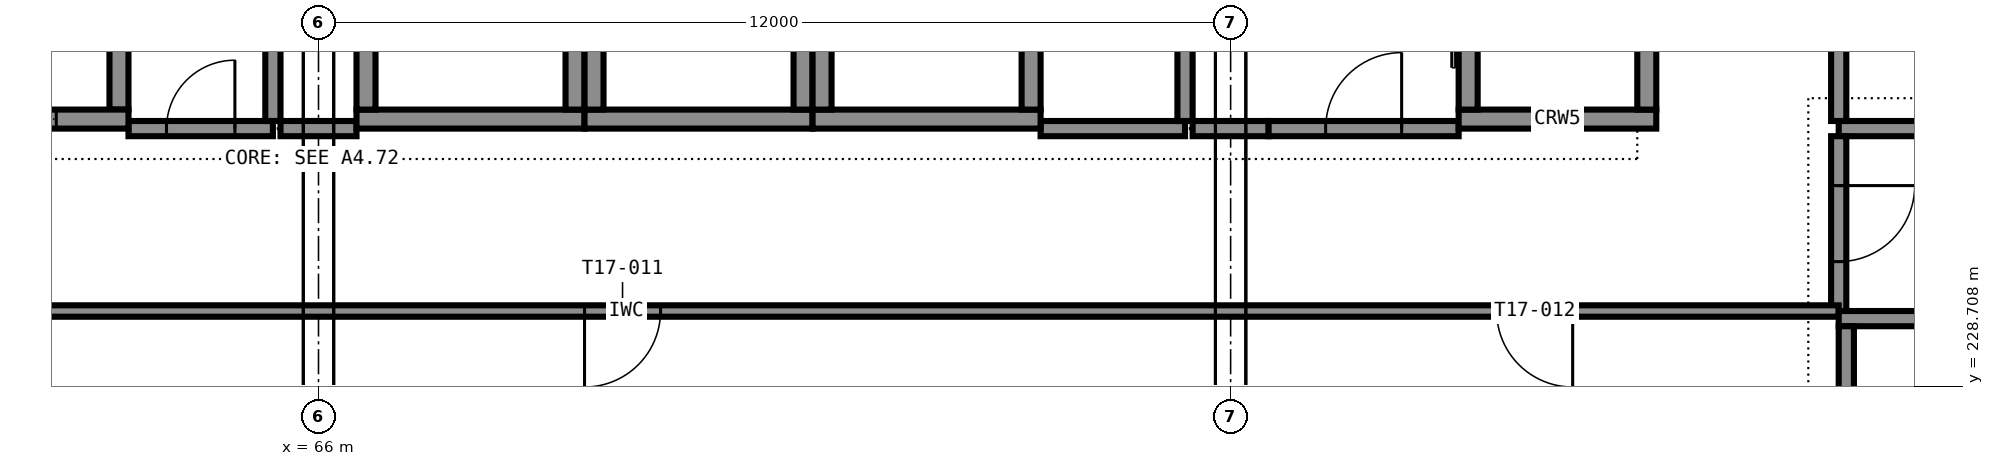
"""IFC4 building model, lengths in metres.
Left out: names, types, materials, properties, quantities, classifications, styles, units other than length and angle.
Written with IfcOpenShell. Run it as: python <this file> out.ifc"""

import sys

from ifc_helpers import new_model, si_unit, direction, frame, frame_2d, origin, place, context, subcontext, project, spatial, rectangle, extrude, element, fill, save


model = new_model("IFC4")
c1 = context("Model", 3, precision=1e-05, world=origin(), true_north=direction((0.0, 1.0)))
c2 = subcontext(c1, "Body", "Model", "MODEL_VIEW")
j1 = project(units=[si_unit("LENGTHUNIT", "METRE"), si_unit("PLANEANGLEUNIT", "RADIAN")], contexts=[c1])
p1 = place(None, origin())
s1 = spatial("IfcSite", under=j1, at=p1, CompositionType="ELEMENT")
p2 = place(p1, origin())
s2 = spatial("IfcBuilding", under=s1, at=p2, CompositionType="ELEMENT")
p3 = place(p2, frame((0.0, 0.0, 67.8)))
s3 = spatial("IfcBuildingStorey", under=s2, at=p3, CompositionType="ELEMENT", Elevation=67.8)
p4 = place(p3, frame((60.5, 232.225, 0.0), z_axis=(0.0, 0.0, 1.0), x_axis=(1.0, 0.0, 0.0)))
e1 = element("IfcWall", 1, at=p4, inside=s3, PredefinedType="SHEAR", context=c2, shape_type="SweptSolid", body=[
    extrude(rectangle(XDim=3.0, YDim=0.25, at=frame_2d((1.5, 0.0))), origin(), (0.0, 0.0, 1.0), 3.6),
])
p5 = place(p4, frame((0.95, 0.0, 0.0)))
e2 = element("IfcOpeningElement", 2, at=p5, cuts=e1, PredefinedType="OPENING", context=c2, shape_type="SweptSolid", body=[
    extrude(rectangle(XDim=1.1, YDim=2.1, at=frame_2d((0.55, 1.05))), frame((0.0, 0.135, 0.0), z_axis=(0.0, -1.0, 0.0), x_axis=(1.0, 0.0, 0.0)), (0.0, 0.0, 1.0), 0.27),
])
p6 = place(p3, frame((63.375, 232.35, 0.0), z_axis=(0.0, 0.0, 1.0), x_axis=(0.0, 1.0, 0.0)))
e3 = element("IfcWall", 3, at=p6, inside=s3, PredefinedType="SHEAR", context=c2, shape_type="SweptSolid", body=[
    extrude(rectangle(XDim=3.3, YDim=0.25, at=frame_2d((1.65, 0.0))), origin(), (0.0, 0.0, 1.0), 3.6),
])
p7 = place(p3, frame((66.5, 232.225, 0.0), z_axis=(0.0, 0.0, 1.0), x_axis=(1.0, 0.0, 0.0)))
e4 = element("IfcWall", 4, at=p7, inside=s3, PredefinedType="SHEAR", context=c2, shape_type="SweptSolid", body=[
    extrude(rectangle(XDim=3.0, YDim=0.25, at=frame_2d((1.5, 0.0))), origin(), (0.0, 0.0, 1.0), 3.6),
])
for number, where, z_axis, x_axis in (
    (5, (66.625, 232.35, 0.0), (0.0, 0.0, 1.0), (0.0, 1.0, 0.0)),
    (6, (69.375, 232.35, 0.0), (0.0, 0.0, 1.0), (0.0, 1.0, 0.0)),
):
    element("IfcWall", number, at=place(p3, frame(where, z_axis=z_axis, x_axis=x_axis)), inside=s3, PredefinedType="SHEAR", context=c2, shape_type="SweptSolid", body=[
        extrude(rectangle(XDim=3.3, YDim=0.25, at=frame_2d((1.65, 0.0))), origin(), (0.0, 0.0, 1.0), 3.6),
    ])
p8 = place(p3, frame((69.5, 232.225, 0.0), z_axis=(0.0, 0.0, 1.0), x_axis=(1.0, 0.0, 0.0)))
e7 = element("IfcWall", 7, at=p8, inside=s3, PredefinedType="SHEAR", context=c2, shape_type="SweptSolid", body=[
    extrude(rectangle(XDim=3.0, YDim=0.25, at=frame_2d((1.5, 0.0))), origin(), (0.0, 0.0, 1.0), 3.6),
])
for number, where, z_axis, x_axis in (
    (8, (69.625, 232.35, 0.0), (0.0, 0.0, 1.0), (0.0, 1.0, 0.0)),
    (9, (72.375, 232.35, 0.0), (0.0, 0.0, 1.0), (0.0, 1.0, 0.0)),
):
    element("IfcWall", number, at=place(p3, frame(where, z_axis=z_axis, x_axis=x_axis)), inside=s3, PredefinedType="SHEAR", context=c2, shape_type="SweptSolid", body=[
        extrude(rectangle(XDim=3.3, YDim=0.25, at=frame_2d((1.65, 0.0))), origin(), (0.0, 0.0, 1.0), 3.6),
    ])
p9 = place(p3, frame((72.5, 232.225, 0.0), z_axis=(0.0, 0.0, 1.0), x_axis=(1.0, 0.0, 0.0)))
e10 = element("IfcWall", 10, at=p9, inside=s3, PredefinedType="SHEAR", context=c2, shape_type="SweptSolid", body=[
    extrude(rectangle(XDim=3.0, YDim=0.25, at=frame_2d((1.5, 0.0))), origin(), (0.0, 0.0, 1.0), 3.6),
])
for number, where, z_axis, x_axis in (
    (11, (72.625, 232.35, 0.0), (0.0, 0.0, 1.0), (0.0, 1.0, 0.0)),
    (12, (75.375, 232.35, 0.0), (0.0, 0.0, 1.0), (0.0, 1.0, 0.0)),
):
    element("IfcWall", number, at=place(p3, frame(where, z_axis=z_axis, x_axis=x_axis)), inside=s3, PredefinedType="SHEAR", context=c2, shape_type="SweptSolid", body=[
        extrude(rectangle(XDim=3.3, YDim=0.25, at=frame_2d((1.65, 0.0))), origin(), (0.0, 0.0, 1.0), 3.6),
    ])
p10 = place(p3, frame((81.0, 232.225, 0.0), z_axis=(0.0, 0.0, 1.0), x_axis=(1.0, 0.0, 0.0)))
e13 = element("IfcWall", 13, at=p10, inside=s3, PredefinedType="SHEAR", context=c2, shape_type="SweptSolid", body=[
    extrude(rectangle(XDim=2.6, YDim=0.25, at=frame_2d((1.3, 0.0))), origin(), (0.0, 0.0, 1.0), 3.6),
])
p11 = place(p3, frame((81.125, 232.35, 0.0), z_axis=(0.0, 0.0, 1.0), x_axis=(0.0, 1.0, 0.0)))
e14 = element("IfcWall", 14, at=p11, inside=s3, PredefinedType="SHEAR", context=c2, shape_type="SweptSolid", body=[
    extrude(rectangle(XDim=3.3, YDim=0.25, at=frame_2d((1.65, 0.0))), origin(), (0.0, 0.0, 1.0), 3.6),
])
p12 = place(p11, frame((1.1, 0.0, 0.0)))
e15 = element("IfcOpeningElement", 15, at=p12, cuts=e14, PredefinedType="OPENING", context=c2, shape_type="SweptSolid", body=[
    extrude(rectangle(XDim=1.1, YDim=2.1, at=frame_2d((0.55, 1.05))), frame((0.0, 0.135, 0.0), z_axis=(0.0, -1.0, 0.0), x_axis=(1.0, 0.0, 0.0)), (0.0, 0.0, 1.0), 0.27),
])
p13 = place(p3, frame((83.475, 232.35, 0.0), z_axis=(0.0, 0.0, 1.0), x_axis=(0.0, 1.0, 0.0)))
e16 = element("IfcWall", 16, at=p13, inside=s3, PredefinedType="SHEAR", context=c2, shape_type="SweptSolid", body=[
    extrude(rectangle(XDim=3.3, YDim=0.25, at=frame_2d((1.65, 0.0))), origin(), (0.0, 0.0, 1.0), 3.6),
])
p14 = place(p3, frame((89.5, 229.6, 0.0), z_axis=(0.0, 0.0, 1.0), x_axis=(-1.0, 0.0, 0.0)))
e17 = element("IfcWall", 17, at=p14, inside=s3, PredefinedType="SHEAR", context=c2, shape_type="SweptSolid", body=[
    extrude(rectangle(XDim=3.5, YDim=0.2, at=frame_2d((1.75, 0.0))), origin(), (0.0, 0.0, 1.0), 3.6),
])
p15 = place(p14, frame((1.15, 0.0, 0.0)))
e18 = element("IfcOpeningElement", 18, at=p15, cuts=e17, PredefinedType="OPENING", context=c2, shape_type="SweptSolid", body=[
    extrude(rectangle(XDim=1.2, YDim=2.1, at=frame_2d((0.6, 1.05))), frame((0.0, 0.11, 0.0), z_axis=(0.0, -1.0, 0.0), x_axis=(1.0, 0.0, 0.0)), (0.0, 0.0, 1.0), 0.22),
])
p16 = place(p3, frame((86.1, 222.0, 0.0), z_axis=(0.0, 0.0, 1.0), x_axis=(0.0, 1.0, 0.0)))
e19 = element("IfcWall", 19, at=p16, inside=s3, PredefinedType="SHEAR", context=c2, shape_type="SweptSolid", body=[
    extrude(rectangle(XDim=7.5, YDim=0.2, at=frame_2d((3.75, 0.0))), origin(), (0.0, 0.0, 1.0), 3.6),
])
p17 = place(p3, frame((63.5, 232.1, 0.0), z_axis=(0.0, 0.0, 1.0), x_axis=(1.0, 0.0, 0.0)))
e20 = element("IfcWall", 20, at=p17, inside=s3, PredefinedType="PARTITIONING", context=c2, shape_type="SweptSolid", body=[
    extrude(rectangle(XDim=1.9, YDim=0.2, at=frame_2d((0.95, 0.0))), origin(), (0.0, 0.0, 1.0), 3.4),
])
p18 = place(p17, frame((0.5, 0.0, 0.0)))
e21 = element("IfcOpeningElement", 21, at=p18, cuts=e20, PredefinedType="OPENING", context=c2, shape_type="SweptSolid", body=[
    extrude(rectangle(XDim=0.9, YDim=2.1, at=frame_2d((0.45, 1.05))), frame((0.0, 0.11, 0.0), z_axis=(0.0, -1.0, 0.0), x_axis=(1.0, 0.0, 0.0)), (0.0, 0.0, 1.0), 0.22),
])
p19 = place(p3, frame((65.5, 232.1, 0.0), z_axis=(0.0, 0.0, 1.0), x_axis=(1.0, 0.0, 0.0)))
e22 = element("IfcWall", 22, at=p19, inside=s3, PredefinedType="PARTITIONING", context=c2, shape_type="SweptSolid", body=[
    extrude(rectangle(XDim=1.0, YDim=0.2, at=frame_2d((0.5, 0.0))), origin(), (0.0, 0.0, 1.0), 3.4),
])
p20 = place(p3, frame((75.5, 232.1, 0.0), z_axis=(0.0, 0.0, 1.0), x_axis=(1.0, 0.0, 0.0)))
e23 = element("IfcWall", 23, at=p20, inside=s3, PredefinedType="PARTITIONING", context=c2, shape_type="SweptSolid", body=[
    extrude(rectangle(XDim=1.9, YDim=0.2, at=frame_2d((0.95, 0.0))), origin(), (0.0, 0.0, 1.0), 3.4),
])
p21 = place(p3, frame((77.5, 232.1, 0.0), z_axis=(0.0, 0.0, 1.0), x_axis=(1.0, 0.0, 0.0)))
e24 = element("IfcWall", 24, at=p21, inside=s3, PredefinedType="PARTITIONING", context=c2, shape_type="SweptSolid", body=[
    extrude(rectangle(XDim=1.0, YDim=0.2, at=frame_2d((0.5, 0.0))), origin(), (0.0, 0.0, 1.0), 3.4),
])
p22 = place(p3, frame((78.5, 232.1, 0.0), z_axis=(0.0, 0.0, 1.0), x_axis=(1.0, 0.0, 0.0)))
e25 = element("IfcWall", 25, at=p22, inside=s3, PredefinedType="PARTITIONING", context=c2, shape_type="SweptSolid", body=[
    extrude(rectangle(XDim=2.5, YDim=0.2, at=frame_2d((1.25, 0.0))), origin(), (0.0, 0.0, 1.0), 3.4),
])
p23 = place(p22, frame((0.75, 0.0, 0.0)))
e26 = element("IfcOpeningElement", 26, at=p23, cuts=e25, PredefinedType="OPENING", context=c2, shape_type="SweptSolid", body=[
    extrude(rectangle(XDim=1.0, YDim=2.1, at=frame_2d((0.5, 1.05))), frame((0.0, 0.11, 0.0), z_axis=(0.0, -1.0, 0.0), x_axis=(1.0, 0.0, 0.0)), (0.0, 0.0, 1.0), 0.22),
])
p24 = place(p3, frame((86.0, 232.1, 0.0), z_axis=(0.0, 0.0, 1.0), x_axis=(1.0, 0.0, 0.0)))
e27 = element("IfcWall", 27, at=p24, inside=s3, PredefinedType="PARTITIONING", context=c2, shape_type="SweptSolid", body=[
    extrude(rectangle(XDim=3.8, YDim=0.2, at=frame_2d((1.9, 0.0))), origin(), (0.0, 0.0, 1.0), 3.4),
])
for number, where, z_axis, x_axis in (
    (28, (65.4, 232.2, 0.0), (0.0, 0.0, 1.0), (0.0, 1.0, 0.0)),
    (29, (77.4, 232.2, 0.0), (0.0, 0.0, 1.0), (0.0, 1.0, 0.0)),
):
    element("IfcWall", number, at=place(p3, frame(where, z_axis=z_axis, x_axis=x_axis)), inside=s3, PredefinedType="PARTITIONING", context=c2, shape_type="SweptSolid", body=[
        extrude(rectangle(XDim=3.6, YDim=0.2, at=frame_2d((1.8, 0.0))), origin(), (0.0, 0.0, 1.0), 3.4),
    ])
p25 = place(p3, frame((86.0, 235.8, 0.0), z_axis=(0.0, 0.0, 1.0), x_axis=(0.0, -1.0, 0.0)))
e30 = element("IfcWall", 30, at=p25, inside=s3, PredefinedType="PARTITIONING", context=c2, shape_type="SweptSolid", body=[
    extrude(rectangle(XDim=3.6, YDim=0.2, at=frame_2d((1.8, 0.0))), origin(), (0.0, 0.0, 1.0), 3.4),
])
p26 = place(p25, frame((1.35, 0.0, 0.0)))
e31 = element("IfcOpeningElement", 31, at=p26, cuts=e30, PredefinedType="OPENING", context=c2, shape_type="SweptSolid", body=[
    extrude(rectangle(XDim=0.9, YDim=2.1, at=frame_2d((0.45, 1.05))), frame((0.0, 0.11, 0.0), z_axis=(0.0, -1.0, 0.0), x_axis=(1.0, 0.0, 0.0)), (0.0, 0.0, 1.0), 0.22),
])
p27 = place(p3, frame((86.0, 232.0, 0.0), z_axis=(0.0, 0.0, 1.0), x_axis=(0.0, -1.0, 0.0)))
e32 = element("IfcWall", 32, at=p27, inside=s3, PredefinedType="PARTITIONING", context=c2, shape_type="SweptSolid", body=[
    extrude(rectangle(XDim=2.3, YDim=0.2, at=frame_2d((1.15, 0.0))), origin(), (0.0, 0.0, 1.0), 3.4),
])
p28 = place(p27, frame((0.65, 0.0, 0.0)))
e33 = element("IfcOpeningElement", 33, at=p28, cuts=e32, PredefinedType="OPENING", context=c2, shape_type="SweptSolid", body=[
    extrude(rectangle(XDim=1.0, YDim=2.1, at=frame_2d((0.5, 1.05))), frame((0.0, 0.11, 0.0), z_axis=(0.0, -1.0, 0.0), x_axis=(1.0, 0.0, 0.0)), (0.0, 0.0, 1.0), 0.22),
])
p29 = place(p3, frame((86.0, 229.7, 0.0), z_axis=(0.0, 0.0, 1.0), x_axis=(-1.0, 0.0, 0.0)))
e34 = element("IfcWall", 34, at=p29, inside=s3, PredefinedType="PARTITIONING", context=c2, shape_type="SweptSolid", body=[
    extrude(rectangle(XDim=31.9, YDim=0.15, at=frame_2d((15.95, 0.0))), origin(), (0.0, 0.0, 1.0), 3.4),
])
p30 = place(p29, frame((27.5, 0.0, 0.0)))
e35 = element("IfcOpeningElement", 35, at=p30, cuts=e34, PredefinedType="OPENING", context=c2, shape_type="SweptSolid", body=[
    extrude(rectangle(XDim=1.0, YDim=2.1, at=frame_2d((0.5, 1.05))), frame((0.0, 0.085, 0.0), z_axis=(0.0, -1.0, 0.0), x_axis=(1.0, 0.0, 0.0)), (0.0, 0.0, 1.0), 0.17),
])
p31 = place(p29, frame((15.5, 0.0, 0.0)))
e36 = element("IfcOpeningElement", 36, at=p31, cuts=e34, PredefinedType="OPENING", context=c2, shape_type="SweptSolid", body=[
    extrude(rectangle(XDim=1.0, YDim=2.1, at=frame_2d((0.5, 1.05))), frame((0.0, 0.085, 0.0), z_axis=(0.0, -1.0, 0.0), x_axis=(1.0, 0.0, 0.0)), (0.0, 0.0, 1.0), 0.17),
])
p32 = place(p29, frame((3.5, 0.0, 0.0)))
e37 = element("IfcOpeningElement", 37, at=p32, cuts=e34, PredefinedType="OPENING", context=c2, shape_type="SweptSolid", body=[
    extrude(rectangle(XDim=1.0, YDim=2.1, at=frame_2d((0.5, 1.05))), frame((0.0, 0.085, 0.0), z_axis=(0.0, -1.0, 0.0), x_axis=(1.0, 0.0, 0.0)), (0.0, 0.0, 1.0), 0.17),
])
p33 = place(p18, origin())
e38 = element("IfcDoor", 38, at=p33, inside=s3, OperationType="SINGLE_SWING_RIGHT", PredefinedType="DOOR", context=c2, shape_type="SweptSolid", body=[
    extrude(rectangle(XDim=0.9, YDim=2.1, at=frame_2d((0.45, 1.05))), frame((0.0, 0.025, 0.0), z_axis=(0.0, -1.0, 0.0), x_axis=(1.0, 0.0, 0.0)), (0.0, 0.0, 1.0), 0.05),
])
fill(e21, e38)
p34 = place(p23, origin())
e39 = element("IfcDoor", 39, at=p34, inside=s3, OperationType="SINGLE_SWING_RIGHT", PredefinedType="DOOR", context=c2, shape_type="SweptSolid", body=[
    extrude(rectangle(XDim=1.0, YDim=2.1, at=frame_2d((0.5, 1.05))), frame((0.0, 0.025, 0.0), z_axis=(0.0, -1.0, 0.0), x_axis=(1.0, 0.0, 0.0)), (0.0, 0.0, 1.0), 0.05),
])
fill(e26, e39)
p35 = place(p28, origin())
e40 = element("IfcDoor", 40, at=p35, inside=s3, OperationType="SINGLE_SWING_LEFT", PredefinedType="DOOR", context=c2, shape_type="SweptSolid", body=[
    extrude(rectangle(XDim=1.0, YDim=2.1, at=frame_2d((0.5, 1.05))), frame((0.0, 0.025, 0.0), z_axis=(0.0, -1.0, 0.0), x_axis=(1.0, 0.0, 0.0)), (0.0, 0.0, 1.0), 0.05),
])
fill(e33, e40)
p36 = place(p31, origin())
e41 = element("IfcDoor", 41, at=p36, inside=s3, OperationType="SINGLE_SWING_RIGHT", PredefinedType="DOOR", context=c2, shape_type="SweptSolid", body=[
    extrude(rectangle(XDim=1.0, YDim=2.1, at=frame_2d((0.5, 1.05))), frame((0.0, 0.025, 0.0), z_axis=(0.0, -1.0, 0.0), x_axis=(1.0, 0.0, 0.0)), (0.0, 0.0, 1.0), 0.05),
])
fill(e36, e41)
p37 = place(p32, origin())
e42 = element("IfcDoor", 42, at=p37, inside=s3, OperationType="SINGLE_SWING_LEFT", PredefinedType="DOOR", context=c2, shape_type="SweptSolid", body=[
    extrude(rectangle(XDim=1.0, YDim=2.1, at=frame_2d((0.5, 1.05))), frame((0.0, 0.025, 0.0), z_axis=(0.0, -1.0, 0.0), x_axis=(1.0, 0.0, 0.0)), (0.0, 0.0, 1.0), 0.05),
])
fill(e37, e42)
p38 = place(p5, origin())
e43 = element("IfcDoor", 43, at=p38, inside=s3, OperationType="SLIDING_TO_LEFT", PredefinedType="DOOR", context=c2, shape_type="SweptSolid", body=[
    extrude(rectangle(XDim=1.1, YDim=2.1, at=frame_2d((0.55, 1.05))), frame((0.0, 0.025, 0.0), z_axis=(0.0, -1.0, 0.0), x_axis=(1.0, 0.0, 0.0)), (0.0, 0.0, 1.0), 0.05),
])
fill(e2, e43)
save(model, sys.argv[1])
